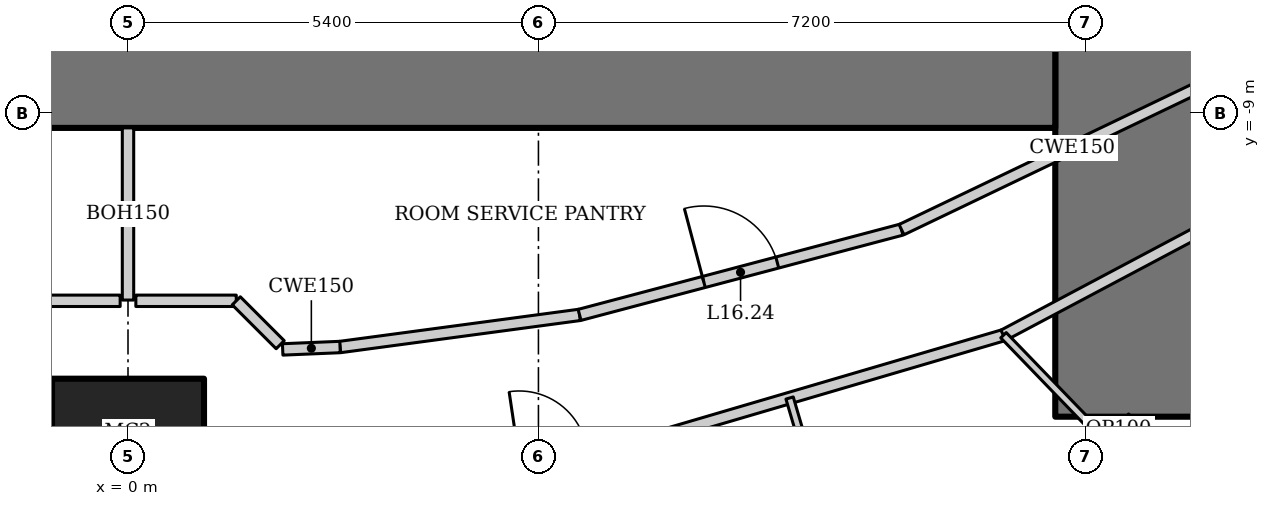
"""IFC4 building model, lengths in metres.
Left out: names, types, materials, properties, quantities, classifications, styles, units other than length and angle.
Written with IfcOpenShell. Run it as: python <this file> out.ifc"""

import sys

from ifc_helpers import new_model, si_unit, direction, frame, frame_2d, origin, origin_2d, place, context, subcontext, project, spatial, rectangle, hollow_rectangle, extrude, element, fill, save


model = new_model("IFC4")
c1 = context("Model", 3, precision=1e-05, world=origin(), true_north=direction((0.0, 1.0)))
c2 = subcontext(c1, "Body", "Model", "MODEL_VIEW")
j1 = project(units=[si_unit("LENGTHUNIT", "METRE"), si_unit("PLANEANGLEUNIT", "RADIAN")], contexts=[c1])
p1 = place(None, origin())
s1 = spatial("IfcSite", under=j1, at=p1, CompositionType="ELEMENT")
p2 = place(p1, origin())
s2 = spatial("IfcBuilding", under=s1, at=p2, CompositionType="ELEMENT")
p3 = place(p2, frame((0.0, 0.0, 73.0)))
s3 = spatial("IfcBuildingStorey", under=s2, at=p3, CompositionType="ELEMENT", Elevation=73.0)
p4 = place(p3, frame((0.0, -13.5, 0.0), z_axis=(0.0, 0.0, 1.0), x_axis=(1.0, 0.0, 0.0)))
e1 = element("IfcColumn", 1, at=p4, inside=s3, PredefinedType="COLUMN", context=c2, shape_type="SweptSolid", body=[
    extrude(hollow_rectangle(XDim=2.0, YDim=2.0, WallThickness=0.17, at=origin_2d()), origin(), (0.0, 0.0, 1.0), 3.6),
])
p5 = place(p3, frame((13.2, -13.0, 0.0), z_axis=(0.0, 0.0, 1.0), x_axis=(0.0, 1.0, 0.0)))
e2 = element("IfcWall", 2, at=p5, inside=s3, PredefinedType="SHEAR", context=c2, shape_type="SweptSolid", body=[
    extrude(rectangle(XDim=26.0, YDim=2.0, at=frame_2d((13.0, 0.0))), origin(), (0.0, 0.0, 1.0), 3.6),
])
p6 = place(p5, frame((12.1, 0.0, 0.0)))
e3 = element("IfcOpeningElement", 3, at=p6, cuts=e2, PredefinedType="OPENING", context=c2, shape_type="SweptSolid", body=[
    extrude(rectangle(XDim=1.8, YDim=2.1, at=frame_2d((0.9, 1.05))), frame((0.0, 1.01, 0.0), z_axis=(0.0, -1.0, 0.0), x_axis=(1.0, 0.0, 0.0)), (0.0, 0.0, 1.0), 2.02),
])
p7 = place(p3, frame((-12.2, -8.0, 0.0), z_axis=(0.0, 0.0, 1.0), x_axis=(1.0, 0.0, 0.0)))
e4 = element("IfcWall", 4, at=p7, inside=s3, PredefinedType="SHEAR", context=c2, shape_type="SweptSolid", body=[
    extrude(rectangle(XDim=24.4, YDim=2.4, at=frame_2d((12.2, 0.0))), origin(), (0.0, 0.0, 1.0), 3.6),
])
p8 = place(p3, frame((6.786, -13.317, 0.0), z_axis=(0.0, 0.0, 1.0), x_axis=(0.959496227294, 0.281721475589, 0.0)))
e5 = element("IfcWall", 5, at=p8, inside=s3, PredefinedType="PARTITIONING", context=c2, shape_type="SweptSolid", body=[
    extrude(rectangle(XDim=4.933, YDim=0.15, at=frame_2d((2.466, 0.0))), origin(), (0.0, 0.0, 1.0), 3.45),
])
p9 = place(p3, frame((11.519, -11.928, 0.0), z_axis=(0.0, 0.0, 1.0), x_axis=(0.883334368785, 0.468743419071, 0.0)))
e6 = element("IfcWall", 6, at=p9, inside=s3, PredefinedType="PARTITIONING", context=c2, shape_type="SweptSolid", body=[
    extrude(rectangle(XDim=5.491, YDim=0.15, at=frame_2d((2.746, 0.0))), origin(), (0.0, 0.0, 1.0), 3.45),
])
p10 = place(p3, frame((2.79, -12.083, 0.0), z_axis=(0.0, 0.0, 1.0), x_axis=(0.991129053928, 0.13290296633, 0.0)))
e7 = element("IfcWall", 7, at=p10, inside=s3, PredefinedType="PARTITIONING", context=c2, shape_type="SweptSolid", body=[
    extrude(rectangle(XDim=3.18, YDim=0.15, at=frame_2d((1.59, 0.0))), origin(), (0.0, 0.0, 1.0), 3.45),
])
p11 = place(p3, frame((5.941, -11.66, 0.0), z_axis=(0.0, 0.0, 1.0), x_axis=(0.966672790407, 0.256015070428, 0.0)))
e8 = element("IfcWall", 8, at=p11, inside=s3, PredefinedType="PARTITIONING", context=c2, shape_type="SweptSolid", body=[
    extrude(rectangle(XDim=4.382, YDim=0.15, at=frame_2d((2.191, 0.0))), origin(), (0.0, 0.0, 1.0), 3.45),
])
p12 = place(p11, frame((1.691, 0.0, 0.0)))
e9 = element("IfcOpeningElement", 9, at=p12, cuts=e8, PredefinedType="OPENING", context=c2, shape_type="SweptSolid", body=[
    extrude(rectangle(XDim=1.0, YDim=2.1, at=frame_2d((0.5, 1.05))), frame((0.0, 0.085, 0.0), z_axis=(0.0, -1.0, 0.0), x_axis=(1.0, 0.0, 0.0)), (0.0, 0.0, 1.0), 0.17),
])
p13 = place(p3, frame((10.177, -10.539, 0.0), z_axis=(0.0, 0.0, 1.0), x_axis=(0.901869692799, 0.43200816799, 0.0)))
e10 = element("IfcWall", 10, at=p13, inside=s3, PredefinedType="PARTITIONING", context=c2, shape_type="SweptSolid", body=[
    extrude(rectangle(XDim=4.986, YDim=0.15, at=frame_2d((2.493, 0.0))), origin(), (0.0, 0.0, 1.0), 3.45),
])
p14 = place(p3, frame((8.705, -12.754, 0.0), z_axis=(0.0, 0.0, 1.0), x_axis=(0.281659633817, -0.959514382736, 0.0)))
e11 = element("IfcWall", 11, at=p14, inside=s3, PredefinedType="PARTITIONING", context=c2, shape_type="SweptSolid", body=[
    extrude(rectangle(XDim=2.4, YDim=0.1, at=frame_2d((1.2, 0.0))), origin(), (0.0, 0.0, 1.0), 3.45),
])
p15 = place(p14, frame((0.7, 0.0, 0.0)))
e12 = element("IfcOpeningElement", 12, at=p15, cuts=e11, PredefinedType="OPENING", context=c2, shape_type="SweptSolid", body=[
    extrude(rectangle(XDim=0.8, YDim=2.1, at=frame_2d((0.4, 1.05))), frame((0.0, 0.06, 0.0), z_axis=(0.0, -1.0, 0.0), x_axis=(1.0, 0.0, 0.0)), (0.0, 0.0, 1.0), 0.12),
])
p16 = place(p3, frame((16.944, -17.545, 0.0), z_axis=(0.0, 0.0, 1.0), x_axis=(-0.694666479492, 0.719331969448, 0.0)))
e13 = element("IfcWall", 13, at=p16, inside=s3, PredefinedType="PARTITIONING", context=c2, shape_type="SweptSolid", body=[
    extrude(rectangle(XDim=7.81, YDim=0.1, at=frame_2d((3.905, 0.0))), origin(), (0.0, 0.0, 1.0), 2.528),
])
p17 = place(p16, frame((3.455, 0.0, 0.0)))
e14 = element("IfcOpeningElement", 14, at=p17, cuts=e13, PredefinedType="OPENING", context=c2, shape_type="SweptSolid", body=[
    extrude(rectangle(XDim=0.9, YDim=2.1, at=frame_2d((0.45, 1.05))), frame((0.0, 0.06, 0.0), z_axis=(0.0, -1.0, 0.0), x_axis=(1.0, 0.0, 0.0)), (0.0, 0.0, 1.0), 0.12),
])
p18 = place(p3, frame((13.2, -13.0, 0.0), z_axis=(0.0, 0.0, 1.0), x_axis=(-0.719347134512, -0.69465077562, 0.0)))
e15 = element("IfcWall", 15, at=p18, inside=s3, PredefinedType="PARTITIONING", context=c2, shape_type="SweptSolid", body=[
    extrude(rectangle(XDim=0.465, YDim=0.1, at=frame_2d((0.232, 0.0))), origin(), (0.0, 0.0, 1.0), 3.45),
])
p19 = place(p3, frame((2.035, -12.115, 0.0), z_axis=(0.0, 0.0, 1.0), x_axis=(0.999116751279, 0.042020439232, 0.0)))
e16 = element("IfcWall", 16, at=p19, inside=s3, PredefinedType="PARTITIONING", context=c2, shape_type="SweptSolid", body=[
    extrude(rectangle(XDim=0.755, YDim=0.15, at=frame_2d((0.378, 0.0))), origin(), (0.0, 0.0, 1.0), 3.45),
])
p20 = place(p3, frame((0.0, -9.2, 0.0), z_axis=(0.0, 0.0, 1.0), x_axis=(0.0, -1.0, 0.0)))
e17 = element("IfcWall", 17, at=p20, inside=s3, PredefinedType="PARTITIONING", context=c2, shape_type="SweptSolid", body=[
    extrude(rectangle(XDim=2.265, YDim=0.15, at=frame_2d((1.133, 0.0))), origin(), (0.0, 0.0, 1.0), 3.044),
])
for number, where, z_axis, x_axis in (
    (18, (-1.425, -11.475, 0.0), (0.0, 0.0, 1.0), (1.0, 0.0, 0.0)),
    (19, (0.103, -11.475, 0.0), (0.0, 0.0, 1.0), (1.0, 0.0, 0.0)),
):
    element("IfcWall", number, at=place(p3, frame(where, z_axis=z_axis, x_axis=x_axis)), inside=s3, PredefinedType="PARTITIONING", context=c2, shape_type="SweptSolid", body=[
        extrude(rectangle(XDim=1.321, YDim=0.15, at=frame_2d((0.661, 0.0))), origin(), (0.0, 0.0, 1.0), 3.45),
    ])
p21 = place(p3, frame((1.425, -11.475, 0.0), z_axis=(0.0, 0.0, 1.0), x_axis=(0.707256164678, -0.706957366129, 0.0)))
e20 = element("IfcWall", 20, at=p21, inside=s3, PredefinedType="PARTITIONING", context=c2, shape_type="SweptSolid", body=[
    extrude(rectangle(XDim=0.817, YDim=0.15, at=frame_2d((0.409, 0.0))), origin(), (0.0, 0.0, 1.0), 3.45),
])
p22 = place(p12, origin())
e21 = element("IfcDoor", 21, at=p22, inside=s3, OperationType="SINGLE_SWING_LEFT", PredefinedType="DOOR", context=c2, shape_type="SweptSolid", body=[
    extrude(rectangle(XDim=1.0, YDim=2.1, at=frame_2d((0.5, 1.05))), frame((0.0, 0.025, 0.0), z_axis=(0.0, -1.0, 0.0), x_axis=(1.0, 0.0, 0.0)), (0.0, 0.0, 1.0), 0.05),
])
fill(e9, e21)
save(model, sys.argv[1])
